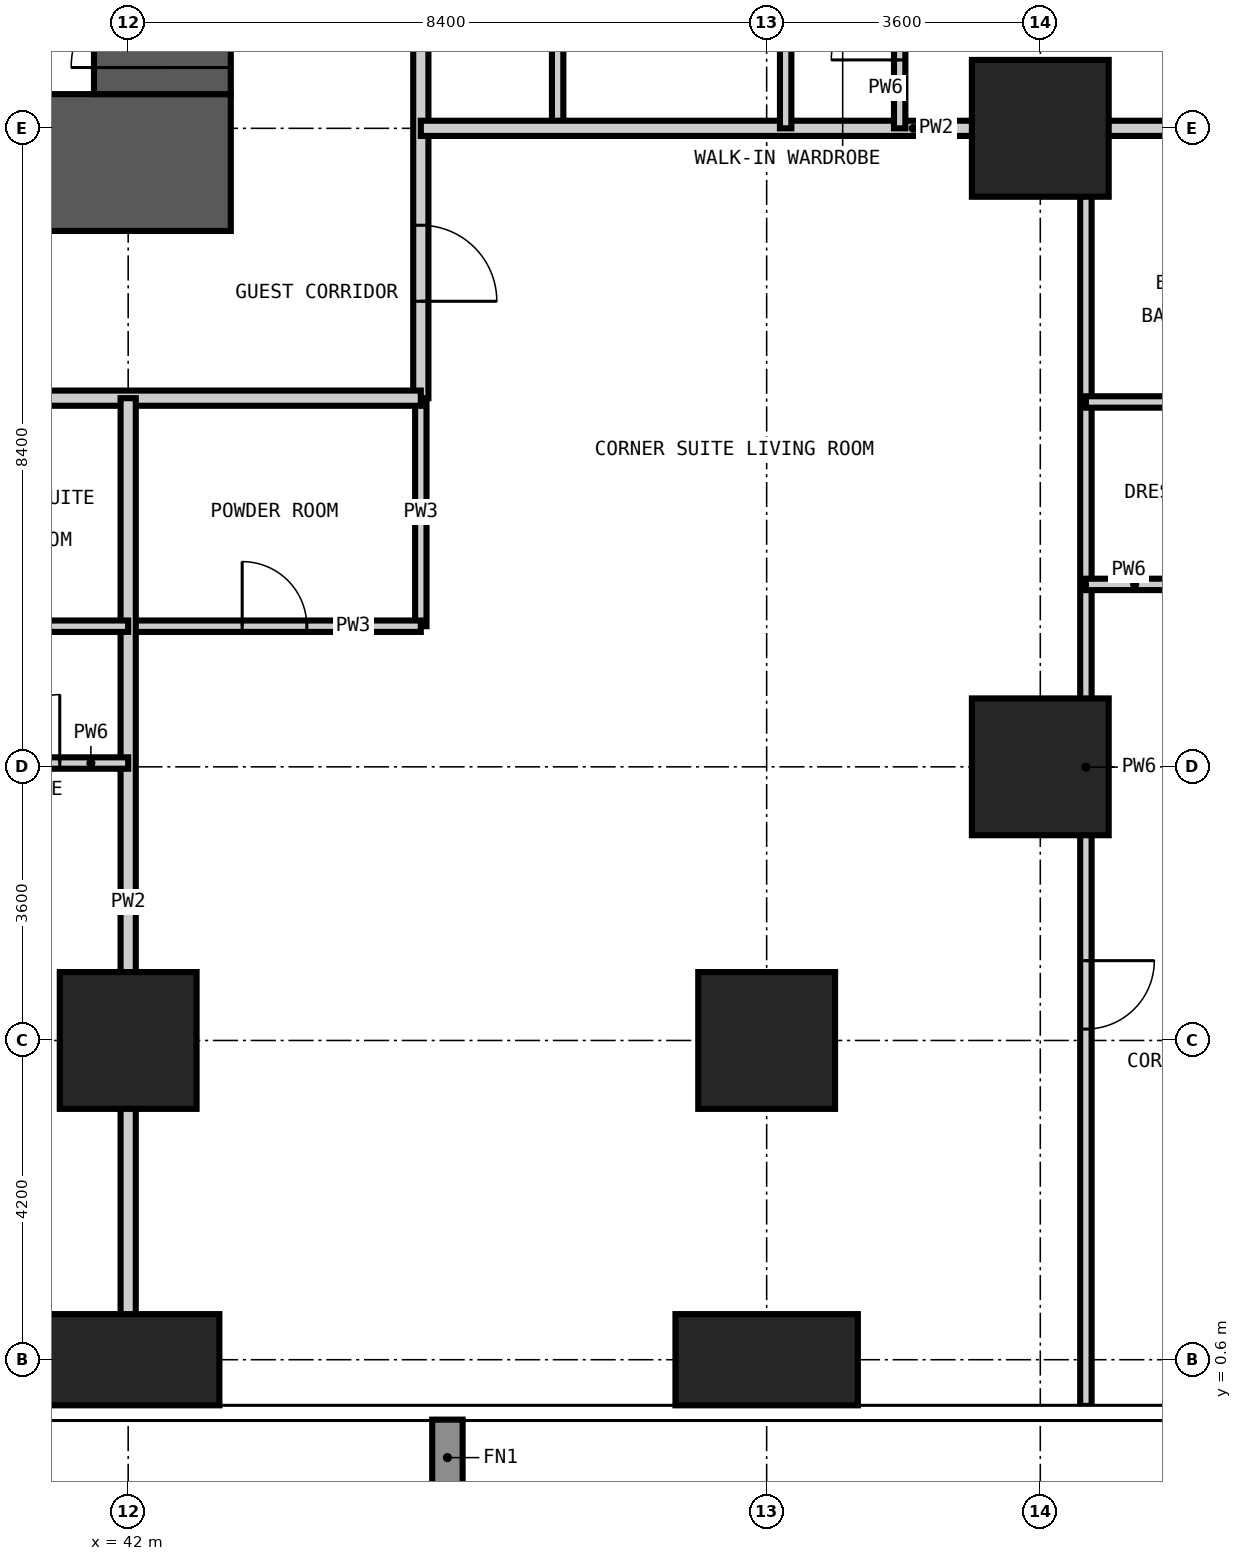
"""IFC4 building model, lengths in metres.
Left out: names, types, materials, properties, quantities, classifications, styles, units other than length and angle.
Written with IfcOpenShell. Run it as: python <this file> out.ifc"""

import sys

from ifc_helpers import new_model, si_unit, direction, frame, frame_2d, origin, origin_2d, place, context, subcontext, project, spatial, rectangle, extrude, element, fill, save


model = new_model("IFC4")
c1 = context("Model", 3, precision=1e-05, world=origin(), true_north=direction((0.0, 1.0)))
c2 = subcontext(c1, "Body", "Model", "MODEL_VIEW")
j1 = project(units=[si_unit("LENGTHUNIT", "METRE"), si_unit("PLANEANGLEUNIT", "RADIAN")], contexts=[c1])
p1 = place(None, origin())
s1 = spatial("IfcSite", under=j1, at=p1, CompositionType="ELEMENT")
p2 = place(p1, origin())
s2 = spatial("IfcBuilding", under=s1, at=p2, CompositionType="ELEMENT")
p3 = place(p2, frame((0.0, 0.0, 34.2)))
s3 = spatial("IfcBuildingStorey", under=s2, at=p3, CompositionType="ELEMENT", Elevation=34.2)
p4 = place(p3, frame((42.0, 0.6, -0.35), z_axis=(0.0, 0.0, 1.0), x_axis=(1.0, 0.0, 0.0)))
e1 = element("IfcColumn", 1, at=p4, inside=s3, PredefinedType="COLUMN", context=c2, shape_type="SweptSolid", body=[
    extrude(rectangle(XDim=2.4, YDim=1.2, at=origin_2d()), origin(), (0.0, 0.0, 1.0), 3.6),
])
p5 = place(p3, frame((42.0, 4.8, -0.35), z_axis=(0.0, 0.0, 1.0), x_axis=(1.0, 0.0, 0.0)))
e2 = element("IfcColumn", 2, at=p5, inside=s3, PredefinedType="COLUMN", context=c2, shape_type="SweptSolid", body=[
    extrude(rectangle(XDim=1.8, YDim=1.8, at=origin_2d()), origin(), (0.0, 0.0, 1.0), 3.6),
])
p6 = place(p3, frame((50.4, 0.6, -0.35), z_axis=(0.0, 0.0, 1.0), x_axis=(1.0, 0.0, 0.0)))
e3 = element("IfcColumn", 3, at=p6, inside=s3, PredefinedType="COLUMN", context=c2, shape_type="SweptSolid", body=[
    extrude(rectangle(XDim=2.4, YDim=1.2, at=origin_2d()), origin(), (0.0, 0.0, 1.0), 3.6),
])
for number, where, z_axis, x_axis in (
    (4, (50.4, 4.8, -0.35), (0.0, 0.0, 1.0), (1.0, 0.0, 0.0)),
    (5, (54.0, 8.4, -0.35), (0.0, 0.0, 1.0), (1.0, 0.0, 0.0)),
    (6, (54.0, 16.8, -0.35), (0.0, 0.0, 1.0), (1.0, 0.0, 0.0)),
):
    element("IfcColumn", number, at=place(p3, frame(where, z_axis=z_axis, x_axis=x_axis)), inside=s3, PredefinedType="COLUMN", context=c2, shape_type="SweptSolid", body=[
        extrude(rectangle(XDim=1.8, YDim=1.8, at=origin_2d()), origin(), (0.0, 0.0, 1.0), 3.6),
    ])
p7 = place(p3, frame((15.45, 16.35, -0.35), z_axis=(0.0, 0.0, 1.0), x_axis=(1.0, 0.0, 0.0)))
e7 = element("IfcWall", 7, at=p7, inside=s3, PredefinedType="SHEAR", context=c2, shape_type="SweptSolid", body=[
    extrude(rectangle(XDim=27.9, YDim=1.8, at=frame_2d((13.95, 0.0))), origin(), (0.0, 0.0, 1.0), 3.6),
])
p8 = place(p7, frame((13.45, 0.0, 0.35)))
e8 = element("IfcOpeningElement", 8, at=p8, cuts=e7, PredefinedType="OPENING", context=c2, shape_type="SweptSolid", body=[
    extrude(rectangle(XDim=1.0, YDim=2.1, at=frame_2d((0.5, 1.05))), frame((0.0, 0.91, 0.0), z_axis=(0.0, -1.0, 0.0), x_axis=(1.0, 0.0, 0.0)), (0.0, 0.0, 1.0), 1.82),
])
p9 = place(p7, frame((19.75, 0.0, 0.35)))
e9 = element("IfcOpeningElement", 9, at=p9, cuts=e7, PredefinedType="OPENING", context=c2, shape_type="SweptSolid", body=[
    extrude(rectangle(XDim=1.0, YDim=2.1, at=frame_2d((0.5, 1.05))), frame((0.0, 0.91, 0.0), z_axis=(0.0, -1.0, 0.0), x_axis=(1.0, 0.0, 0.0)), (0.0, 0.0, 1.0), 1.82),
])
p10 = place(p3, frame((42.45, 17.25, -0.35), z_axis=(0.0, 0.0, 1.0), x_axis=(0.0, 1.0, 0.0)))
e10 = element("IfcWall", 10, at=p10, inside=s3, PredefinedType="SHEAR", context=c2, shape_type="SweptSolid", body=[
    extrude(rectangle(XDim=24.3, YDim=1.8, at=frame_2d((12.15, 0.0))), origin(), (0.0, 0.0, 1.0), 3.6),
])
p11 = place(p10, frame((0.35, 0.0, 0.35)))
e11 = element("IfcOpeningElement", 11, at=p11, cuts=e10, PredefinedType="OPENING", context=c2, shape_type="SweptSolid", body=[
    extrude(rectangle(XDim=1.2, YDim=2.2, at=frame_2d((0.6, 1.1))), frame((0.0, 0.91, 0.0), z_axis=(0.0, -1.0, 0.0), x_axis=(1.0, 0.0, 0.0)), (0.0, 0.0, 1.0), 1.82),
])
p12 = place(p10, frame((11.65, 0.0, 0.35)))
e12 = element("IfcOpeningElement", 12, at=p12, cuts=e10, PredefinedType="OPENING", context=c2, shape_type="SweptSolid", body=[
    extrude(rectangle(XDim=1.0, YDim=2.1, at=frame_2d((0.5, 1.05))), frame((0.0, 0.91, 0.0), z_axis=(0.0, -1.0, 0.0), x_axis=(1.0, 0.0, 0.0)), (0.0, 0.0, 1.0), 1.82),
])
p13 = place(p10, frame((20.05, 0.0, 0.35)))
e13 = element("IfcOpeningElement", 13, at=p13, cuts=e10, PredefinedType="OPENING", context=c2, shape_type="SweptSolid", body=[
    extrude(rectangle(XDim=1.0, YDim=2.1, at=frame_2d((0.5, 1.05))), frame((0.0, 0.91, 0.0), z_axis=(0.0, -1.0, 0.0), x_axis=(1.0, 0.0, 0.0)), (0.0, 0.0, 1.0), 1.82),
])
p14 = place(p3, frame((45.85, 10.25, 0.0), z_axis=(0.0, 0.0, 1.0), x_axis=(0.0, 1.0, 0.0)))
e14 = element("IfcWall", 14, at=p14, inside=s3, PredefinedType="PARTITIONING", context=c2, shape_type="SweptSolid", body=[
    extrude(rectangle(XDim=3.0, YDim=0.15, at=frame_2d((1.5, 0.0))), origin(), (0.0, 0.0, 1.0), 3.25),
])
p15 = place(p3, frame((47.65, 16.8, 0.0), z_axis=(0.0, 0.0, 1.0), x_axis=(0.0, 1.0, 0.0)))
e15 = element("IfcWall", 15, at=p15, inside=s3, PredefinedType="PARTITIONING", context=c2, shape_type="SweptSolid", body=[
    extrude(rectangle(XDim=2.7, YDim=0.15, at=frame_2d((1.35, 0.0))), origin(), (0.0, 0.0, 1.0), 3.25),
])
p16 = place(p3, frame((42.0, 10.25, 0.0), z_axis=(0.0, 0.0, 1.0), x_axis=(1.0, 0.0, 0.0)))
e16 = element("IfcWall", 16, at=p16, inside=s3, PredefinedType="PARTITIONING", context=c2, shape_type="SweptSolid", body=[
    extrude(rectangle(XDim=3.85, YDim=0.15, at=frame_2d((1.925, 0.0))), origin(), (0.0, 0.0, 1.0), 3.25),
])
p17 = place(p16, frame((1.5, 0.0, 0.0)))
e17 = element("IfcOpeningElement", 17, at=p17, cuts=e16, PredefinedType="OPENING", context=c2, shape_type="SweptSolid", body=[
    extrude(rectangle(XDim=0.85, YDim=2.1, at=frame_2d((0.425, 1.05))), frame((0.0, 0.085, 0.0), z_axis=(0.0, -1.0, 0.0), x_axis=(1.0, 0.0, 0.0)), (0.0, 0.0, 1.0), 0.17),
])
p18 = place(p3, frame((45.85, 45.25, 0.0), z_axis=(0.0, 0.0, 1.0), x_axis=(0.0, -1.0, 0.0)))
e18 = element("IfcWall", 18, at=p18, inside=s3, PredefinedType="PARTITIONING", context=c2, shape_type="SweptSolid", body=[
    extrude(rectangle(XDim=32.0, YDim=0.2, at=frame_2d((16.0, 0.0))), origin(), (0.0, 0.0, 1.0), 3.25),
])
p19 = place(p18, frame((23.75, 0.0, 0.0)))
e19 = element("IfcOpeningElement", 19, at=p19, cuts=e18, PredefinedType="OPENING", context=c2, shape_type="SweptSolid", body=[
    extrude(rectangle(XDim=1.0, YDim=2.2, at=frame_2d((0.5, 1.1))), frame((0.0, 0.11, 0.0), z_axis=(0.0, -1.0, 0.0), x_axis=(1.0, 0.0, 0.0)), (0.0, 0.0, 1.0), 0.22),
])
p20 = place(p18, frame((15.35, 0.0, 0.0)))
e20 = element("IfcOpeningElement", 20, at=p20, cuts=e18, PredefinedType="OPENING", context=c2, shape_type="SweptSolid", body=[
    extrude(rectangle(XDim=1.0, YDim=2.2, at=frame_2d((0.5, 1.1))), frame((0.0, 0.11, 0.0), z_axis=(0.0, -1.0, 0.0), x_axis=(1.0, 0.0, 0.0)), (0.0, 0.0, 1.0), 0.22),
])
p21 = place(p18, frame((6.95, 0.0, 0.0)))
e21 = element("IfcOpeningElement", 21, at=p21, cuts=e18, PredefinedType="OPENING", context=c2, shape_type="SweptSolid", body=[
    extrude(rectangle(XDim=1.0, YDim=2.2, at=frame_2d((0.5, 1.1))), frame((0.0, 0.11, 0.0), z_axis=(0.0, -1.0, 0.0), x_axis=(1.0, 0.0, 0.0)), (0.0, 0.0, 1.0), 0.22),
])
p22 = place(p18, frame((29.725, 0.0, 0.0)))
e22 = element("IfcOpeningElement", 22, at=p22, cuts=e18, PredefinedType="OPENING", context=c2, shape_type="SweptSolid", body=[
    extrude(rectangle(XDim=1.0, YDim=2.2, at=frame_2d((0.5, 1.1))), frame((0.0, 0.11, 0.0), z_axis=(0.0, -1.0, 0.0), x_axis=(1.0, 0.0, 0.0)), (0.0, 0.0, 1.0), 0.22),
])
p23 = place(p18, frame((1.125, 0.0, 0.0)))
e23 = element("IfcOpeningElement", 23, at=p23, cuts=e18, PredefinedType="OPENING", context=c2, shape_type="SweptSolid", body=[
    extrude(rectangle(XDim=1.0, YDim=2.2, at=frame_2d((0.5, 1.1))), frame((0.0, 0.11, 0.0), z_axis=(0.0, -1.0, 0.0), x_axis=(1.0, 0.0, 0.0)), (0.0, 0.0, 1.0), 0.22),
])
p24 = place(p3, frame((45.85, 13.25, 0.0), z_axis=(0.0, 0.0, 1.0), x_axis=(-1.0, 0.0, 0.0)))
e24 = element("IfcWall", 24, at=p24, inside=s3, PredefinedType="PARTITIONING", context=c2, shape_type="SweptSolid", body=[
    extrude(rectangle(XDim=32.6, YDim=0.2, at=frame_2d((16.3, 0.0))), origin(), (0.0, 0.0, 1.0), 3.25),
])
p25 = place(p24, frame((25.1, 0.0, 0.0)))
e25 = element("IfcOpeningElement", 25, at=p25, cuts=e24, PredefinedType="OPENING", context=c2, shape_type="SweptSolid", body=[
    extrude(rectangle(XDim=1.0, YDim=2.2, at=frame_2d((0.5, 1.1))), frame((0.0, 0.11, 0.0), z_axis=(0.0, -1.0, 0.0), x_axis=(1.0, 0.0, 0.0)), (0.0, 0.0, 1.0), 0.22),
])
p26 = place(p24, frame((21.65, 0.0, 0.0)))
e26 = element("IfcOpeningElement", 26, at=p26, cuts=e24, PredefinedType="OPENING", context=c2, shape_type="SweptSolid", body=[
    extrude(rectangle(XDim=1.0, YDim=2.2, at=frame_2d((0.5, 1.1))), frame((0.0, 0.11, 0.0), z_axis=(0.0, -1.0, 0.0), x_axis=(1.0, 0.0, 0.0)), (0.0, 0.0, 1.0), 0.22),
])
p27 = place(p24, frame((11.75, 0.0, 0.0)))
e27 = element("IfcOpeningElement", 27, at=p27, cuts=e24, PredefinedType="OPENING", context=c2, shape_type="SweptSolid", body=[
    extrude(rectangle(XDim=1.0, YDim=2.2, at=frame_2d((0.5, 1.1))), frame((0.0, 0.11, 0.0), z_axis=(0.0, -1.0, 0.0), x_axis=(1.0, 0.0, 0.0)), (0.0, 0.0, 1.0), 0.22),
])
p28 = place(p24, frame((6.8, 0.0, 0.0)))
e28 = element("IfcOpeningElement", 28, at=p28, cuts=e24, PredefinedType="OPENING", context=c2, shape_type="SweptSolid", body=[
    extrude(rectangle(XDim=1.0, YDim=2.2, at=frame_2d((0.5, 1.1))), frame((0.0, 0.11, 0.0), z_axis=(0.0, -1.0, 0.0), x_axis=(1.0, 0.0, 0.0)), (0.0, 0.0, 1.0), 0.22),
])
p29 = place(p3, frame((42.0, -0.008, 0.0), z_axis=(0.0, 0.0, 1.0), x_axis=(0.0, 1.0, 0.0)))
e29 = element("IfcWall", 29, at=p29, inside=s3, PredefinedType="PARTITIONING", context=c2, shape_type="SweptSolid", body=[
    extrude(rectangle(XDim=13.258, YDim=0.2, at=frame_2d((6.629, 0.0))), origin(), (0.0, 0.0, 1.0), 3.25),
])
p30 = place(p3, frame((45.85, 16.8, 0.0), z_axis=(0.0, 0.0, 1.0), x_axis=(1.0, 0.0, 0.0)))
e30 = element("IfcWall", 30, at=p30, inside=s3, PredefinedType="PARTITIONING", context=c2, shape_type="SweptSolid", body=[
    extrude(rectangle(XDim=12.958, YDim=0.2, at=frame_2d((6.479, 0.0))), origin(), (0.0, 0.0, 1.0), 3.25),
])
p31 = place(p3, frame((50.65, 16.8, 0.0), z_axis=(0.0, 0.0, 1.0), x_axis=(0.0, 1.0, 0.0)))
e31 = element("IfcWall", 31, at=p31, inside=s3, PredefinedType="PARTITIONING", context=c2, shape_type="SweptSolid", body=[
    extrude(rectangle(XDim=2.7, YDim=0.15, at=frame_2d((1.35, 0.0))), origin(), (0.0, 0.0, 1.0), 3.25),
])
p32 = place(p3, frame((52.15, 16.8, 0.0), z_axis=(0.0, 0.0, 1.0), x_axis=(0.0, 1.0, 0.0)))
e32 = element("IfcWall", 32, at=p32, inside=s3, PredefinedType="PARTITIONING", context=c2, shape_type="SweptSolid", body=[
    extrude(rectangle(XDim=2.7, YDim=0.15, at=frame_2d((1.35, 0.0))), origin(), (0.0, 0.0, 1.0), 3.25),
])
p33 = place(p32, frame((0.9, 0.0, 0.0)))
e33 = element("IfcOpeningElement", 33, at=p33, cuts=e32, PredefinedType="OPENING", context=c2, shape_type="SweptSolid", body=[
    extrude(rectangle(XDim=0.9, YDim=2.1, at=frame_2d((0.45, 1.05))), frame((0.0, 0.085, 0.0), z_axis=(0.0, -1.0, 0.0), x_axis=(1.0, 0.0, 0.0)), (0.0, 0.0, 1.0), 0.17),
])
p34 = place(p3, frame((54.6, -0.008, 0.0), z_axis=(0.0, 0.0, 1.0), x_axis=(0.0, 1.0, 0.0)))
e34 = element("IfcWall", 34, at=p34, inside=s3, PredefinedType="PARTITIONING", context=c2, shape_type="SweptSolid", body=[
    extrude(rectangle(XDim=16.808, YDim=0.15, at=frame_2d((8.404, 0.0))), origin(), (0.0, 0.0, 1.0), 3.25),
])
p35 = place(p34, frame((4.958, 0.0, 0.0)))
e35 = element("IfcOpeningElement", 35, at=p35, cuts=e34, PredefinedType="OPENING", context=c2, shape_type="SweptSolid", body=[
    extrude(rectangle(XDim=0.9, YDim=2.1, at=frame_2d((0.45, 1.05))), frame((0.0, 0.085, 0.0), z_axis=(0.0, -1.0, 0.0), x_axis=(1.0, 0.0, 0.0)), (0.0, 0.0, 1.0), 0.17),
])
p36 = place(p3, frame((39.3, 8.45, 0.0), z_axis=(0.0, 0.0, 1.0), x_axis=(1.0, 0.0, 0.0)))
e36 = element("IfcWall", 36, at=p36, inside=s3, PredefinedType="PARTITIONING", context=c2, shape_type="SweptSolid", body=[
    extrude(rectangle(XDim=2.7, YDim=0.15, at=frame_2d((1.35, 0.0))), origin(), (0.0, 0.0, 1.0), 3.25),
])
p37 = place(p36, frame((0.9, 0.0, 0.0)))
e37 = element("IfcOpeningElement", 37, at=p37, cuts=e36, PredefinedType="OPENING", context=c2, shape_type="SweptSolid", body=[
    extrude(rectangle(XDim=0.9, YDim=2.1, at=frame_2d((0.45, 1.05))), frame((0.0, 0.085, 0.0), z_axis=(0.0, -1.0, 0.0), x_axis=(1.0, 0.0, 0.0)), (0.0, 0.0, 1.0), 0.17),
])
p38 = place(p3, frame((39.3, 10.25, 0.0), z_axis=(0.0, 0.0, 1.0), x_axis=(1.0, 0.0, 0.0)))
e38 = element("IfcWall", 38, at=p38, inside=s3, PredefinedType="PARTITIONING", context=c2, shape_type="SweptSolid", body=[
    extrude(rectangle(XDim=2.7, YDim=0.15, at=frame_2d((1.35, 0.0))), origin(), (0.0, 0.0, 1.0), 3.25),
])
p39 = place(p3, frame((54.6, 10.8, 0.0), z_axis=(0.0, 0.0, 1.0), x_axis=(1.0, 0.0, 0.0)))
e39 = element("IfcWall", 39, at=p39, inside=s3, PredefinedType="PARTITIONING", context=c2, shape_type="SweptSolid", body=[
    extrude(rectangle(XDim=3.0, YDim=0.15, at=frame_2d((1.5, 0.0))), origin(), (0.0, 0.0, 1.0), 3.25),
])
p40 = place(p39, frame((1.05, 0.0, 0.0)))
e40 = element("IfcOpeningElement", 40, at=p40, cuts=e39, PredefinedType="OPENING", context=c2, shape_type="SweptSolid", body=[
    extrude(rectangle(XDim=0.9, YDim=2.1, at=frame_2d((0.45, 1.05))), frame((0.0, 0.085, 0.0), z_axis=(0.0, -1.0, 0.0), x_axis=(1.0, 0.0, 0.0)), (0.0, 0.0, 1.0), 0.17),
])
p41 = place(p3, frame((54.6, 13.2, 0.0), z_axis=(0.0, 0.0, 1.0), x_axis=(1.0, 0.0, 0.0)))
e41 = element("IfcWall", 41, at=p41, inside=s3, PredefinedType="PARTITIONING", context=c2, shape_type="SweptSolid", body=[
    extrude(rectangle(XDim=3.0, YDim=0.15, at=frame_2d((1.5, 0.0))), origin(), (0.0, 0.0, 1.0), 3.25),
])
p42 = place(p11, origin())
e42 = element("IfcDoor", 42, at=p42, inside=s3, OperationType="SINGLE_SWING_LEFT", PredefinedType="DOOR", context=c2, shape_type="SweptSolid", body=[
    extrude(rectangle(XDim=1.2, YDim=2.2, at=frame_2d((0.6, 1.1))), frame((0.0, 0.025, 0.0), z_axis=(0.0, -1.0, 0.0), x_axis=(1.0, 0.0, 0.0)), (0.0, 0.0, 1.0), 0.05),
])
fill(e11, e42)
p43 = place(p37, origin())
e43 = element("IfcDoor", 43, at=p43, inside=s3, OperationType="SINGLE_SWING_RIGHT", PredefinedType="DOOR", context=c2, shape_type="SweptSolid", body=[
    extrude(rectangle(XDim=0.9, YDim=2.1, at=frame_2d((0.45, 1.05))), frame((0.0, 0.025, 0.0), z_axis=(0.0, -1.0, 0.0), x_axis=(1.0, 0.0, 0.0)), (0.0, 0.0, 1.0), 0.05),
])
fill(e37, e43)
p44 = place(p33, origin())
e44 = element("IfcDoor", 44, at=p44, inside=s3, OperationType="SINGLE_SWING_LEFT", PredefinedType="DOOR", context=c2, shape_type="SweptSolid", body=[
    extrude(rectangle(XDim=0.9, YDim=2.1, at=frame_2d((0.45, 1.05))), frame((0.0, 0.025, 0.0), z_axis=(0.0, -1.0, 0.0), x_axis=(1.0, 0.0, 0.0)), (0.0, 0.0, 1.0), 0.05),
])
fill(e33, e44)
p45 = place(p22, origin())
e45 = element("IfcDoor", 45, at=p45, inside=s3, OperationType="SINGLE_SWING_RIGHT", PredefinedType="DOOR", context=c2, shape_type="SweptSolid", body=[
    extrude(rectangle(XDim=1.0, YDim=2.2, at=frame_2d((0.5, 1.1))), frame((0.0, 0.025, 0.0), z_axis=(0.0, -1.0, 0.0), x_axis=(1.0, 0.0, 0.0)), (0.0, 0.0, 1.0), 0.05),
])
fill(e22, e45)
p46 = place(p17, origin())
e46 = element("IfcDoor", 46, at=p46, inside=s3, OperationType="SINGLE_SWING_LEFT", PredefinedType="DOOR", context=c2, shape_type="SweptSolid", body=[
    extrude(rectangle(XDim=0.85, YDim=2.1, at=frame_2d((0.425, 1.05))), frame((0.0, 0.025, 0.0), z_axis=(0.0, -1.0, 0.0), x_axis=(1.0, 0.0, 0.0)), (0.0, 0.0, 1.0), 0.05),
])
fill(e17, e46)
p47 = place(p35, frame((0.9, 0.0, 0.0), z_axis=(0.0, 0.0, 1.0), x_axis=(-1.0, 0.0, 0.0)))
e47 = element("IfcDoor", 47, at=p47, inside=s3, OperationType="SINGLE_SWING_LEFT", PredefinedType="DOOR", context=c2, shape_type="SweptSolid", body=[
    extrude(rectangle(XDim=0.9, YDim=2.1, at=frame_2d((0.45, 1.05))), frame((0.0, 0.025, 0.0), z_axis=(0.0, -1.0, 0.0), x_axis=(1.0, 0.0, 0.0)), (0.0, 0.0, 1.0), 0.05),
])
fill(e35, e47)
save(model, sys.argv[1])
